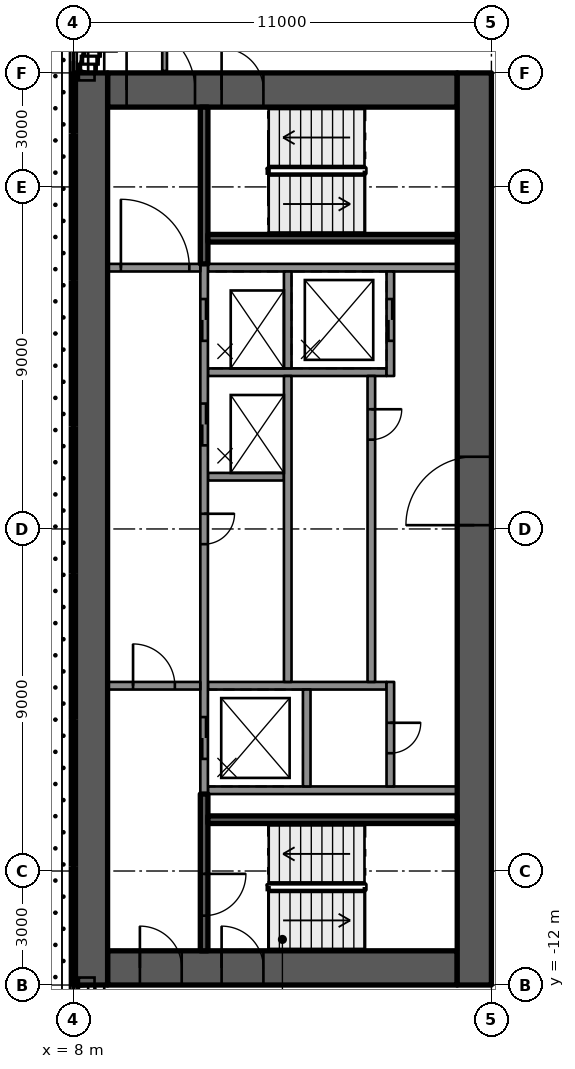
"""IFC4 building model, lengths in metres.
Left out: names, types, materials, properties, quantities, classifications, styles, units other than length and angle.
Written with IfcOpenShell. Run it as: python <this file> out.ifc"""

import sys

from ifc_helpers import new_model, si_unit, direction, frame, frame_2d, origin, place, context, subcontext, project, spatial, rectangle, extrude, element, fill, save


model = new_model("IFC4")
c1 = context("Model", 3, precision=1e-05, world=origin(), true_north=direction((0.0, 1.0)))
c2 = subcontext(c1, "Body", "Model", "MODEL_VIEW")
j1 = project(units=[si_unit("LENGTHUNIT", "METRE"), si_unit("PLANEANGLEUNIT", "RADIAN")], contexts=[c1])
p1 = place(None, origin())
s1 = spatial("IfcSite", under=j1, at=p1, CompositionType="ELEMENT")
p2 = place(p1, origin())
s2 = spatial("IfcBuilding", under=s1, at=p2, CompositionType="ELEMENT")
p3 = place(p2, frame((0.0, 0.0, 253.5)))
s3 = spatial("IfcBuildingStorey", under=s2, at=p3, CompositionType="ELEMENT", Elevation=253.5)
p4 = place(p3, frame((8.9, 11.55, 0.0), z_axis=(0.0, 0.0, 1.0), x_axis=(1.0, 0.0, 0.0)))
e1 = element("IfcWall", 1, at=p4, inside=s3, PredefinedType="SHEAR", context=c2, shape_type="SweptSolid", body=[
    extrude(rectangle(XDim=9.2, YDim=0.9, at=frame_2d((4.6, 0.0))), origin(), (0.0, 0.0, 1.0), 3.5),
])
p5 = place(p4, frame((0.5, 0.0, 0.0)))
e2 = element("IfcOpeningElement", 2, at=p5, cuts=e1, PredefinedType="OPENING", context=c2, shape_type="SweptSolid", body=[
    extrude(rectangle(XDim=1.8, YDim=2.1, at=frame_2d((0.9, 1.05))), frame((0.0, 0.46, 0.0), z_axis=(0.0, -1.0, 0.0), x_axis=(1.0, 0.0, 0.0)), (0.0, 0.0, 1.0), 0.92),
])
p6 = place(p4, frame((3.0, 0.0, 0.0)))
e3 = element("IfcOpeningElement", 3, at=p6, cuts=e1, PredefinedType="OPENING", context=c2, shape_type="SweptSolid", body=[
    extrude(rectangle(XDim=1.1, YDim=2.1, at=frame_2d((0.55, 1.05))), frame((0.0, 0.46, 0.0), z_axis=(0.0, -1.0, 0.0), x_axis=(1.0, 0.0, 0.0)), (0.0, 0.0, 1.0), 0.92),
])
p7 = place(p3, frame((8.9, -11.55, 0.0), z_axis=(0.0, 0.0, 1.0), x_axis=(1.0, 0.0, 0.0)))
e4 = element("IfcWall", 4, at=p7, inside=s3, PredefinedType="SHEAR", context=c2, shape_type="SweptSolid", body=[
    extrude(rectangle(XDim=9.2, YDim=0.9, at=frame_2d((4.6, 0.0))), origin(), (0.0, 0.0, 1.0), 3.5),
])
p8 = place(p7, frame((0.85, 0.0, 0.0)))
e5 = element("IfcOpeningElement", 5, at=p8, cuts=e4, PredefinedType="OPENING", context=c2, shape_type="SweptSolid", body=[
    extrude(rectangle(XDim=1.1, YDim=2.1, at=frame_2d((0.55, 1.05))), frame((0.0, 0.46, 0.0), z_axis=(0.0, -1.0, 0.0), x_axis=(1.0, 0.0, 0.0)), (0.0, 0.0, 1.0), 0.92),
])
p9 = place(p7, frame((3.0, 0.0, 0.0)))
e6 = element("IfcOpeningElement", 6, at=p9, cuts=e4, PredefinedType="OPENING", context=c2, shape_type="SweptSolid", body=[
    extrude(rectangle(XDim=1.1, YDim=2.1, at=frame_2d((0.55, 1.05))), frame((0.0, 0.46, 0.0), z_axis=(0.0, -1.0, 0.0), x_axis=(1.0, 0.0, 0.0)), (0.0, 0.0, 1.0), 0.92),
])
p10 = place(p3, frame((8.45, -12.0, 0.0), z_axis=(0.0, 0.0, 1.0), x_axis=(0.0, 1.0, 0.0)))
e7 = element("IfcWall", 7, at=p10, inside=s3, PredefinedType="SHEAR", context=c2, shape_type="SweptSolid", body=[
    extrude(rectangle(XDim=24.0, YDim=0.9, at=frame_2d((12.0, 0.0))), origin(), (0.0, 0.0, 1.0), 3.5),
])
p11 = place(p3, frame((18.55, -12.0, 0.0), z_axis=(0.0, 0.0, 1.0), x_axis=(0.0, 1.0, 0.0)))
e8 = element("IfcWall", 8, at=p11, inside=s3, PredefinedType="SHEAR", context=c2, shape_type="SweptSolid", body=[
    extrude(rectangle(XDim=24.0, YDim=0.9, at=frame_2d((12.0, 0.0))), origin(), (0.0, 0.0, 1.0), 3.5),
])
p12 = place(p11, frame((12.1, 0.0, 0.0)))
e9 = element("IfcOpeningElement", 9, at=p12, cuts=e8, PredefinedType="OPENING", context=c2, shape_type="SweptSolid", body=[
    extrude(rectangle(XDim=1.8, YDim=2.1, at=frame_2d((0.9, 1.05))), frame((0.0, 0.46, 0.0), z_axis=(0.0, -1.0, 0.0), x_axis=(1.0, 0.0, 0.0)), (0.0, 0.0, 1.0), 0.92),
])
for number, where, z_axis, x_axis in (
    (10, (11.54, -6.875, 0.0), (0.0, 0.0, 1.0), (1.0, 0.0, 0.0)),
    (11, (11.54, 6.875, 0.0), (0.0, 0.0, 1.0), (1.0, 0.0, 0.0)),
):
    element("IfcWall", number, at=place(p3, frame(where, z_axis=z_axis, x_axis=x_axis)), inside=s3, PredefinedType="SOLIDWALL", context=c2, shape_type="SweptSolid", body=[
        extrude(rectangle(XDim=6.56, YDim=0.2, at=frame_2d((3.28, 0.0))), origin(), (0.0, 0.0, 1.0), 3.09),
    ])
p13 = place(p3, frame((11.54, 4.125, 0.0), z_axis=(0.0, 0.0, 1.0), x_axis=(1.0, 0.0, 0.0)))
e12 = element("IfcWall", 12, at=p13, inside=s3, PredefinedType="SOLIDWALL", context=c2, shape_type="SweptSolid", body=[
    extrude(rectangle(XDim=4.7, YDim=0.2, at=frame_2d((2.35, 0.0))), origin(), (0.0, 0.0, 1.0), 3.09),
])
p14 = place(p3, frame((11.54, 1.375, 0.0), z_axis=(0.0, 0.0, 1.0), x_axis=(1.0, 0.0, 0.0)))
e13 = element("IfcWall", 13, at=p14, inside=s3, PredefinedType="SOLIDWALL", context=c2, shape_type="SweptSolid", body=[
    extrude(rectangle(XDim=2.0, YDim=0.2, at=frame_2d((1.0, 0.0))), origin(), (0.0, 0.0, 1.0), 3.09),
])
p15 = place(p3, frame((11.54, -4.125, 0.0), z_axis=(0.0, 0.0, 1.0), x_axis=(1.0, 0.0, 0.0)))
e14 = element("IfcWall", 14, at=p15, inside=s3, PredefinedType="SOLIDWALL", context=c2, shape_type="SweptSolid", body=[
    extrude(rectangle(XDim=4.7, YDim=0.2, at=frame_2d((2.35, 0.0))), origin(), (0.0, 0.0, 1.0), 3.09),
])
p16 = place(p3, frame((11.44, 6.975, 0.0), z_axis=(0.0, 0.0, 1.0), x_axis=(0.0, -1.0, 0.0)))
e15 = element("IfcWall", 15, at=p16, inside=s3, PredefinedType="SOLIDWALL", context=c2, shape_type="SweptSolid", body=[
    extrude(rectangle(XDim=13.95, YDim=0.2, at=frame_2d((6.975, 0.0))), origin(), (0.0, 0.0, 1.0), 3.09),
])
p17 = place(p16, frame((0.925, 0.0, 0.0)))
e16 = element("IfcOpeningElement", 16, at=p17, cuts=e15, PredefinedType="OPENING", context=c2, shape_type="SweptSolid", body=[
    extrude(rectangle(XDim=1.1, YDim=2.1, at=frame_2d((0.55, 1.05))), frame((0.0, 0.11, 0.0), z_axis=(0.0, -1.0, 0.0), x_axis=(1.0, 0.0, 0.0)), (0.0, 0.0, 1.0), 0.22),
])
p18 = place(p16, frame((3.675, 0.0, 0.0)))
e17 = element("IfcOpeningElement", 17, at=p18, cuts=e15, PredefinedType="OPENING", context=c2, shape_type="SweptSolid", body=[
    extrude(rectangle(XDim=1.1, YDim=2.1, at=frame_2d((0.55, 1.05))), frame((0.0, 0.11, 0.0), z_axis=(0.0, -1.0, 0.0), x_axis=(1.0, 0.0, 0.0)), (0.0, 0.0, 1.0), 0.22),
])
p19 = place(p16, frame((11.925, 0.0, 0.0)))
e18 = element("IfcOpeningElement", 18, at=p19, cuts=e15, PredefinedType="OPENING", context=c2, shape_type="SweptSolid", body=[
    extrude(rectangle(XDim=1.1, YDim=2.1, at=frame_2d((0.55, 1.05))), frame((0.0, 0.11, 0.0), z_axis=(0.0, -1.0, 0.0), x_axis=(1.0, 0.0, 0.0)), (0.0, 0.0, 1.0), 0.22),
])
p20 = place(p16, frame((6.575, 0.0, 0.0)))
e19 = element("IfcOpeningElement", 19, at=p20, cuts=e15, PredefinedType="OPENING", context=c2, shape_type="SweptSolid", body=[
    extrude(rectangle(XDim=0.8, YDim=2.1, at=frame_2d((0.4, 1.05))), frame((0.0, 0.11, 0.0), z_axis=(0.0, -1.0, 0.0), x_axis=(1.0, 0.0, 0.0)), (0.0, 0.0, 1.0), 0.22),
])
p21 = place(p3, frame((13.64, 6.775, 0.0), z_axis=(0.0, 0.0, 1.0), x_axis=(0.0, -1.0, 0.0)))
e20 = element("IfcWall", 20, at=p21, inside=s3, PredefinedType="SOLIDWALL", context=c2, shape_type="SweptSolid", body=[
    extrude(rectangle(XDim=2.55, YDim=0.2, at=frame_2d((1.275, 0.0))), origin(), (0.0, 0.0, 1.0), 3.09),
])
p22 = place(p3, frame((13.64, 4.025, 0.0), z_axis=(0.0, 0.0, 1.0), x_axis=(0.0, -1.0, 0.0)))
e21 = element("IfcWall", 21, at=p22, inside=s3, PredefinedType="SOLIDWALL", context=c2, shape_type="SweptSolid", body=[
    extrude(rectangle(XDim=8.05, YDim=0.2, at=frame_2d((4.025, 0.0))), origin(), (0.0, 0.0, 1.0), 3.09),
])
p23 = place(p3, frame((14.14, -4.225, 0.0), z_axis=(0.0, 0.0, 1.0), x_axis=(0.0, -1.0, 0.0)))
e22 = element("IfcWall", 22, at=p23, inside=s3, PredefinedType="SOLIDWALL", context=c2, shape_type="SweptSolid", body=[
    extrude(rectangle(XDim=2.55, YDim=0.2, at=frame_2d((1.275, 0.0))), origin(), (0.0, 0.0, 1.0), 3.09),
])
p24 = place(p3, frame((16.34, 6.775, 0.0), z_axis=(0.0, 0.0, 1.0), x_axis=(0.0, -1.0, 0.0)))
e23 = element("IfcWall", 23, at=p24, inside=s3, PredefinedType="SOLIDWALL", context=c2, shape_type="SweptSolid", body=[
    extrude(rectangle(XDim=2.75, YDim=0.2, at=frame_2d((1.375, 0.0))), origin(), (0.0, 0.0, 1.0), 3.09),
])
p25 = place(p24, frame((0.725, 0.0, 0.0)))
e24 = element("IfcOpeningElement", 24, at=p25, cuts=e23, PredefinedType="OPENING", context=c2, shape_type="SweptSolid", body=[
    extrude(rectangle(XDim=1.1, YDim=2.1, at=frame_2d((0.55, 1.05))), frame((0.0, 0.11, 0.0), z_axis=(0.0, -1.0, 0.0), x_axis=(1.0, 0.0, 0.0)), (0.0, 0.0, 1.0), 0.22),
])
p26 = place(p3, frame((15.84, 4.025, 0.0), z_axis=(0.0, 0.0, 1.0), x_axis=(0.0, -1.0, 0.0)))
e25 = element("IfcWall", 25, at=p26, inside=s3, PredefinedType="SOLIDWALL", context=c2, shape_type="SweptSolid", body=[
    extrude(rectangle(XDim=8.05, YDim=0.2, at=frame_2d((4.025, 0.0))), origin(), (0.0, 0.0, 1.0), 3.09),
])
p27 = place(p26, frame((0.875, 0.0, 0.0)))
e26 = element("IfcOpeningElement", 26, at=p27, cuts=e25, PredefinedType="OPENING", context=c2, shape_type="SweptSolid", body=[
    extrude(rectangle(XDim=0.8, YDim=2.1, at=frame_2d((0.4, 1.05))), frame((0.0, 0.11, 0.0), z_axis=(0.0, -1.0, 0.0), x_axis=(1.0, 0.0, 0.0)), (0.0, 0.0, 1.0), 0.22),
])
p28 = place(p3, frame((16.34, -4.025, 0.0), z_axis=(0.0, 0.0, 1.0), x_axis=(0.0, -1.0, 0.0)))
e27 = element("IfcWall", 27, at=p28, inside=s3, PredefinedType="SOLIDWALL", context=c2, shape_type="SweptSolid", body=[
    extrude(rectangle(XDim=2.75, YDim=0.2, at=frame_2d((1.375, 0.0))), origin(), (0.0, 0.0, 1.0), 3.09),
])
p29 = place(p28, frame((1.075, 0.0, 0.0)))
e28 = element("IfcOpeningElement", 28, at=p29, cuts=e27, PredefinedType="OPENING", context=c2, shape_type="SweptSolid", body=[
    extrude(rectangle(XDim=0.8, YDim=2.1, at=frame_2d((0.4, 1.05))), frame((0.0, 0.11, 0.0), z_axis=(0.0, -1.0, 0.0), x_axis=(1.0, 0.0, 0.0)), (0.0, 0.0, 1.0), 0.22),
])
p30 = place(p3, frame((11.44, -6.975, 0.0), z_axis=(0.0, 0.0, 1.0), x_axis=(0.0, -1.0, 0.0)))
e29 = element("IfcWall", 29, at=p30, inside=s3, PredefinedType="SOLIDWALL", context=c2, shape_type="SweptSolid", body=[
    extrude(rectangle(XDim=4.125, YDim=0.2, at=frame_2d((2.062, 0.0))), origin(), (0.0, 0.0, 1.0), 3.09),
])
p31 = place(p30, frame((2.1, 0.0, 0.0)))
e30 = element("IfcOpeningElement", 30, at=p31, cuts=e29, PredefinedType="OPENING", context=c2, shape_type="SweptSolid", body=[
    extrude(rectangle(XDim=1.1, YDim=2.1, at=frame_2d((0.55, 1.05))), frame((0.0, 0.11, 0.0), z_axis=(0.0, -1.0, 0.0), x_axis=(1.0, 0.0, 0.0)), (0.0, 0.0, 1.0), 0.22),
])
p32 = place(p3, frame((11.54, -7.65, 0.0), z_axis=(0.0, 0.0, 1.0), x_axis=(1.0, 0.0, 0.0)))
e31 = element("IfcWall", 31, at=p32, inside=s3, PredefinedType="SOLIDWALL", context=c2, shape_type="SweptSolid", body=[
    extrude(rectangle(XDim=6.56, YDim=0.2, at=frame_2d((3.28, 0.0))), origin(), (0.0, 0.0, 1.0), 3.09),
])
p33 = place(p3, frame((11.44, 11.1, 0.0), z_axis=(0.0, 0.0, 1.0), x_axis=(0.0, -1.0, 0.0)))
e32 = element("IfcWall", 32, at=p33, inside=s3, PredefinedType="SOLIDWALL", context=c2, shape_type="SweptSolid", body=[
    extrude(rectangle(XDim=4.125, YDim=0.2, at=frame_2d((2.062, 0.0))), origin(), (0.0, 0.0, 1.0), 3.09),
])
p34 = place(p3, frame((11.54, 7.65, 0.0), z_axis=(0.0, 0.0, 1.0), x_axis=(1.0, 0.0, 0.0)))
e33 = element("IfcWall", 33, at=p34, inside=s3, PredefinedType="SOLIDWALL", context=c2, shape_type="SweptSolid", body=[
    extrude(rectangle(XDim=6.56, YDim=0.2, at=frame_2d((3.28, 0.0))), origin(), (0.0, 0.0, 1.0), 3.09),
])
p35 = place(p3, frame((8.9, -4.125, 0.0), z_axis=(0.0, 0.0, 1.0), x_axis=(1.0, 0.0, 0.0)))
e34 = element("IfcWall", 34, at=p35, inside=s3, PredefinedType="PARTITIONING", context=c2, shape_type="SweptSolid", body=[
    extrude(rectangle(XDim=2.44, YDim=0.2, at=frame_2d((1.22, 0.0))), origin(), (0.0, 0.0, 1.0), 3.09),
])
p36 = place(p35, frame((0.67, 0.0, 0.0)))
e35 = element("IfcOpeningElement", 35, at=p36, cuts=e34, PredefinedType="OPENING", context=c2, shape_type="SweptSolid", body=[
    extrude(rectangle(XDim=1.1, YDim=2.1, at=frame_2d((0.55, 1.05))), frame((0.0, 0.11, 0.0), z_axis=(0.0, -1.0, 0.0), x_axis=(1.0, 0.0, 0.0)), (0.0, 0.0, 1.0), 0.22),
])
p37 = place(p3, frame((8.9, 6.875, 0.0), z_axis=(0.0, 0.0, 1.0), x_axis=(1.0, 0.0, 0.0)))
e36 = element("IfcWall", 36, at=p37, inside=s3, PredefinedType="PARTITIONING", context=c2, shape_type="SweptSolid", body=[
    extrude(rectangle(XDim=2.44, YDim=0.2, at=frame_2d((1.22, 0.0))), origin(), (0.0, 0.0, 1.0), 3.09),
])
p38 = place(p37, frame((0.35, 0.0, 0.0)))
e37 = element("IfcOpeningElement", 37, at=p38, cuts=e36, PredefinedType="OPENING", context=c2, shape_type="SweptSolid", body=[
    extrude(rectangle(XDim=1.8, YDim=2.1, at=frame_2d((0.9, 1.05))), frame((0.0, 0.11, 0.0), z_axis=(0.0, -1.0, 0.0), x_axis=(1.0, 0.0, 0.0)), (0.0, 0.0, 1.0), 0.22),
])
p39 = place(p3, frame((10.4, 12.05, 0.0), z_axis=(0.0, 0.0, 1.0), x_axis=(0.0, 1.0, 0.0)))
e38 = element("IfcWall", 38, at=p39, inside=s3, PredefinedType="PARTITIONING", context=c2, shape_type="SweptSolid", body=[
    extrude(rectangle(XDim=2.442, YDim=0.125, at=frame_2d((1.221, 0.0))), origin(), (0.0, 0.0, 1.0), 3.08),
])
p40 = place(p39, frame((0.6, 0.0, 0.0)))
e39 = element("IfcOpeningElement", 39, at=p40, cuts=e38, PredefinedType="OPENING", context=c2, shape_type="SweptSolid", body=[
    extrude(rectangle(XDim=1.1, YDim=2.1, at=frame_2d((0.55, 1.05))), frame((0.0, 0.073, 0.0), z_axis=(0.0, -1.0, 0.0), x_axis=(1.0, 0.0, 0.0)), (0.0, 0.0, 1.0), 0.145),
])
p41 = place(p17, origin())
e40 = element("IfcDoor", 40, at=p41, inside=s3, OperationType="DOUBLE_DOOR_SLIDING", PredefinedType="DOOR", context=c2, shape_type="SweptSolid", body=[
    extrude(rectangle(XDim=1.1, YDim=2.1, at=frame_2d((0.55, 1.05))), frame((0.0, 0.025, 0.0), z_axis=(0.0, -1.0, 0.0), x_axis=(1.0, 0.0, 0.0)), (0.0, 0.0, 1.0), 0.05),
])
fill(e16, e40)
p42 = place(p25, origin())
e41 = element("IfcDoor", 41, at=p42, inside=s3, OperationType="DOUBLE_DOOR_SLIDING", PredefinedType="DOOR", context=c2, shape_type="SweptSolid", body=[
    extrude(rectangle(XDim=1.1, YDim=2.1, at=frame_2d((0.55, 1.05))), frame((0.0, 0.025, 0.0), z_axis=(0.0, -1.0, 0.0), x_axis=(1.0, 0.0, 0.0)), (0.0, 0.0, 1.0), 0.05),
])
fill(e24, e41)
p43 = place(p18, origin())
e42 = element("IfcDoor", 42, at=p43, inside=s3, OperationType="DOUBLE_DOOR_SLIDING", PredefinedType="DOOR", context=c2, shape_type="SweptSolid", body=[
    extrude(rectangle(XDim=1.1, YDim=2.1, at=frame_2d((0.55, 1.05))), frame((0.0, 0.025, 0.0), z_axis=(0.0, -1.0, 0.0), x_axis=(1.0, 0.0, 0.0)), (0.0, 0.0, 1.0), 0.05),
])
fill(e17, e42)
p44 = place(p19, origin())
e43 = element("IfcDoor", 43, at=p44, inside=s3, OperationType="DOUBLE_DOOR_SLIDING", PredefinedType="DOOR", context=c2, shape_type="SweptSolid", body=[
    extrude(rectangle(XDim=1.1, YDim=2.1, at=frame_2d((0.55, 1.05))), frame((0.0, 0.025, 0.0), z_axis=(0.0, -1.0, 0.0), x_axis=(1.0, 0.0, 0.0)), (0.0, 0.0, 1.0), 0.05),
])
fill(e18, e43)
p45 = place(p27, origin())
e44 = element("IfcDoor", 44, at=p45, inside=s3, OperationType="SINGLE_SWING_LEFT", PredefinedType="DOOR", context=c2, shape_type="SweptSolid", body=[
    extrude(rectangle(XDim=0.8, YDim=2.1, at=frame_2d((0.4, 1.05))), frame((0.0, 0.025, 0.0), z_axis=(0.0, -1.0, 0.0), x_axis=(1.0, 0.0, 0.0)), (0.0, 0.0, 1.0), 0.05),
])
fill(e26, e44)
p46 = place(p20, origin())
e45 = element("IfcDoor", 45, at=p46, inside=s3, OperationType="SINGLE_SWING_LEFT", PredefinedType="DOOR", context=c2, shape_type="SweptSolid", body=[
    extrude(rectangle(XDim=0.8, YDim=2.1, at=frame_2d((0.4, 1.05))), frame((0.0, 0.025, 0.0), z_axis=(0.0, -1.0, 0.0), x_axis=(1.0, 0.0, 0.0)), (0.0, 0.0, 1.0), 0.05),
])
fill(e19, e45)
p47 = place(p29, origin())
e46 = element("IfcDoor", 46, at=p47, inside=s3, OperationType="SINGLE_SWING_LEFT", PredefinedType="DOOR", context=c2, shape_type="SweptSolid", body=[
    extrude(rectangle(XDim=0.8, YDim=2.1, at=frame_2d((0.4, 1.05))), frame((0.0, 0.025, 0.0), z_axis=(0.0, -1.0, 0.0), x_axis=(1.0, 0.0, 0.0)), (0.0, 0.0, 1.0), 0.05),
])
fill(e28, e46)
p48 = place(p12, origin())
e47 = element("IfcDoor", 47, at=p48, inside=s3, OperationType="SINGLE_SWING_RIGHT", PredefinedType="DOOR", context=c2, shape_type="SweptSolid", body=[
    extrude(rectangle(XDim=1.8, YDim=2.1, at=frame_2d((0.9, 1.05))), frame((0.0, 0.025, 0.0), z_axis=(0.0, -1.0, 0.0), x_axis=(1.0, 0.0, 0.0)), (0.0, 0.0, 1.0), 0.05),
])
fill(e9, e47)
p49 = place(p8, origin())
e48 = element("IfcDoor", 48, at=p49, inside=s3, OperationType="SINGLE_SWING_LEFT", PredefinedType="DOOR", context=c2, shape_type="SweptSolid", body=[
    extrude(rectangle(XDim=1.1, YDim=2.1, at=frame_2d((0.55, 1.05))), frame((0.0, 0.025, 0.0), z_axis=(0.0, -1.0, 0.0), x_axis=(1.0, 0.0, 0.0)), (0.0, 0.0, 1.0), 0.05),
])
fill(e5, e48)
p50 = place(p36, origin())
e49 = element("IfcDoor", 49, at=p50, inside=s3, OperationType="SINGLE_SWING_RIGHT", PredefinedType="DOOR", context=c2, shape_type="SweptSolid", body=[
    extrude(rectangle(XDim=1.1, YDim=2.1, at=frame_2d((0.55, 1.05))), frame((0.0, 0.025, 0.0), z_axis=(0.0, -1.0, 0.0), x_axis=(1.0, 0.0, 0.0)), (0.0, 0.0, 1.0), 0.05),
])
fill(e35, e49)
p51 = place(p38, origin())
e50 = element("IfcDoor", 50, at=p51, inside=s3, OperationType="DOUBLE_DOOR_DOUBLE_SWING", PredefinedType="DOOR", context=c2, shape_type="SweptSolid", body=[
    extrude(rectangle(XDim=1.8, YDim=2.1, at=frame_2d((0.9, 1.05))), frame((0.0, 0.025, 0.0), z_axis=(0.0, -1.0, 0.0), x_axis=(1.0, 0.0, 0.0)), (0.0, 0.0, 1.0), 0.05),
])
fill(e37, e50)
p52 = place(p5, origin())
e51 = element("IfcDoor", 51, at=p52, inside=s3, OperationType="SINGLE_SWING_LEFT", PredefinedType="DOOR", context=c2, shape_type="SweptSolid", body=[
    extrude(rectangle(XDim=1.8, YDim=2.1, at=frame_2d((0.9, 1.05))), frame((0.0, 0.025, 0.0), z_axis=(0.0, -1.0, 0.0), x_axis=(1.0, 0.0, 0.0)), (0.0, 0.0, 1.0), 0.05),
])
fill(e2, e51)
p53 = place(p9, origin())
e52 = element("IfcDoor", 52, at=p53, inside=s3, OperationType="SINGLE_SWING_LEFT", PredefinedType="DOOR", context=c2, shape_type="SweptSolid", body=[
    extrude(rectangle(XDim=1.1, YDim=2.1, at=frame_2d((0.55, 1.05))), frame((0.0, 0.025, 0.0), z_axis=(0.0, -1.0, 0.0), x_axis=(1.0, 0.0, 0.0)), (0.0, 0.0, 1.0), 0.05),
])
fill(e6, e52)
p54 = place(p6, origin())
e53 = element("IfcDoor", 53, at=p54, inside=s3, OperationType="SINGLE_SWING_LEFT", PredefinedType="DOOR", context=c2, shape_type="SweptSolid", body=[
    extrude(rectangle(XDim=1.1, YDim=2.1, at=frame_2d((0.55, 1.05))), frame((0.0, 0.025, 0.0), z_axis=(0.0, -1.0, 0.0), x_axis=(1.0, 0.0, 0.0)), (0.0, 0.0, 1.0), 0.05),
])
fill(e3, e53)
p55 = place(p31, origin())
e54 = element("IfcDoor", 54, at=p55, inside=s3, OperationType="SINGLE_SWING_RIGHT", PredefinedType="DOOR", context=c2, shape_type="SweptSolid", body=[
    extrude(rectangle(XDim=1.1, YDim=2.1, at=frame_2d((0.55, 1.05))), frame((0.0, 0.025, 0.0), z_axis=(0.0, -1.0, 0.0), x_axis=(1.0, 0.0, 0.0)), (0.0, 0.0, 1.0), 0.05),
])
fill(e30, e54)
save(model, sys.argv[1])
